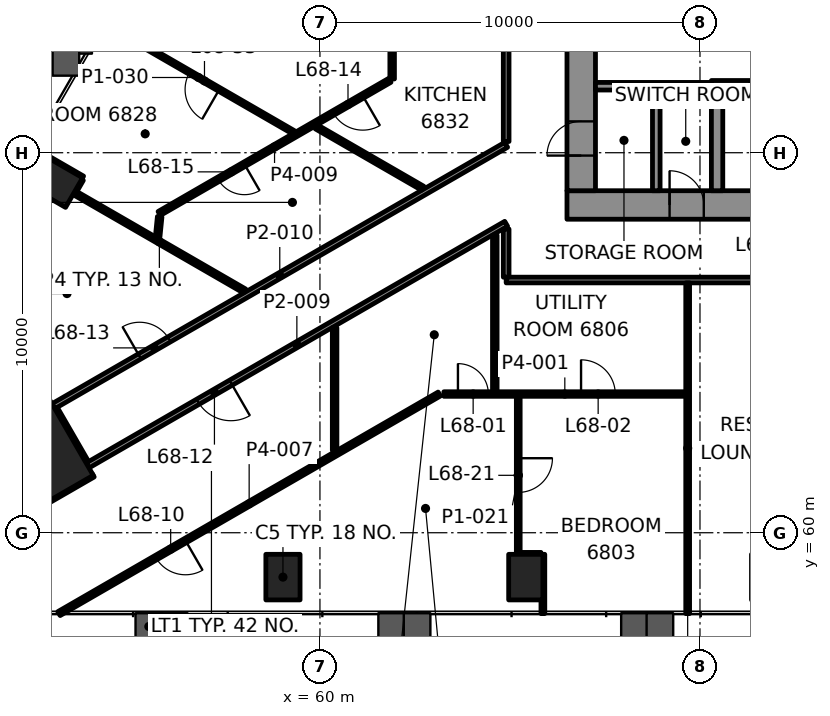
"""IFC4 building model, lengths in metres.
Left out: names, types, materials, properties, quantities, classifications, styles, units other than length and angle.
Written with IfcOpenShell. Run it as: python <this file> out.ifc"""

import sys

from ifc_helpers import new_model, si_unit, direction, frame, frame_2d, origin, origin_2d, place, context, subcontext, project, spatial, rectangle, hollow_rectangle, extrude, element, fill, save


model = new_model("IFC4")
c1 = context("Model", 3, precision=1e-05, world=origin(), true_north=direction((0.0, 1.0)))
c2 = subcontext(c1, "Body", "Model", "MODEL_VIEW")
j1 = project(units=[si_unit("LENGTHUNIT", "METRE"), si_unit("PLANEANGLEUNIT", "RADIAN")], contexts=[c1])
p1 = place(None, origin())
s1 = spatial("IfcSite", under=j1, at=p1, CompositionType="ELEMENT")
p2 = place(p1, origin())
s2 = spatial("IfcBuilding", under=s1, at=p2, CompositionType="ELEMENT")
p3 = place(p2, frame((0.0, 0.0, 284.6)))
s3 = spatial("IfcBuildingStorey", under=s2, at=p3, CompositionType="ELEMENT", Elevation=284.6)
p4 = place(p3, frame((52.396, 61.95, 0.0), z_axis=(0.0, 0.0, 1.0), x_axis=(0.5, -0.866025403784, 0.0)))
e1 = element("IfcColumn", 1, at=p4, inside=s3, PredefinedType="COLUMN", context=c2, shape_type="SweptSolid", body=[
    extrude(rectangle(XDim=2.4, YDim=2.4, at=origin_2d()), origin(), (0.0, 0.0, 1.0), 3.5),
])
for number, where, z_axis, x_axis in (
    (2, (59.027, 58.832, -0.0), (0.0, 0.0, 1.0), (1.0, 0.0, 0.0)),
    (3, (65.416, 58.832, -0.0), (0.0, 0.0, 1.0), (1.0, 0.0, 0.0)),
    (4, (53.011, 69.251, -0.0), (0.0, 0.0, 1.0), (-0.5, -0.866, 0.0)),
):
    element("IfcColumn", number, at=place(p3, frame(where, z_axis=z_axis, x_axis=x_axis)), inside=s3, PredefinedType="COLUMN", context=c2, shape_type="SweptSolid", body=[
        extrude(hollow_rectangle(XDim=0.9, YDim=1.2, WallThickness=0.06, at=origin_2d()), origin(), (0.0, 0.0, 1.0), 3.5),
    ])
p5 = place(p3, frame((66.5, 68.625, 0.0), z_axis=(0.0, 0.0, 1.0), x_axis=(1.0, 0.0, 0.0)))
e5 = element("IfcWall", 5, at=p5, inside=s3, PredefinedType="SHEAR", context=c2, shape_type="SweptSolid", body=[
    extrude(rectangle(XDim=17.0, YDim=0.75, at=frame_2d((8.5, 0.0))), origin(), (0.0, 0.0, 1.0), 3.3),
])
p6 = place(p5, frame((2.7, 0.0, 0.0)))
e6 = element("IfcOpeningElement", 6, at=p6, cuts=e5, PredefinedType="OPENING", context=c2, shape_type="SweptSolid", body=[
    extrude(rectangle(XDim=0.9, YDim=2.1, at=frame_2d((0.45, 1.05))), frame((0.0, 0.385, 0.0), z_axis=(0.0, -1.0, 0.0), x_axis=(1.0, 0.0, 0.0)), (0.0, 0.0, 1.0), 0.77),
])
p7 = place(p3, frame((66.875, 69.0, 0.0), z_axis=(0.0, 0.0, 1.0), x_axis=(0.0, 1.0, 0.0)))
e7 = element("IfcWall", 7, at=p7, inside=s3, PredefinedType="SHEAR", context=c2, shape_type="SweptSolid", body=[
    extrude(rectangle(XDim=12.0, YDim=0.75, at=frame_2d((6.0, 0.0))), origin(), (0.0, 0.0, 1.0), 3.3),
])
p8 = place(p7, frame((3.7, 0.0, 0.0)))
e8 = element("IfcOpeningElement", 8, at=p8, cuts=e7, PredefinedType="OPENING", context=c2, shape_type="SweptSolid", body=[
    extrude(rectangle(XDim=1.2, YDim=2.1, at=frame_2d((0.6, 1.05))), frame((0.0, 0.385, 0.0), z_axis=(0.0, -1.0, 0.0), x_axis=(1.0, 0.0, 0.0)), (0.0, 0.0, 1.0), 0.77),
])
p9 = place(p7, frame((0.925, 0.0, 0.0)))
e9 = element("IfcOpeningElement", 9, at=p9, cuts=e7, PredefinedType="OPENING", context=c2, shape_type="SweptSolid", body=[
    extrude(rectangle(XDim=0.9, YDim=2.1, at=frame_2d((0.45, 1.05))), frame((0.0, 0.385, 0.0), z_axis=(0.0, -1.0, 0.0), x_axis=(1.0, 0.0, 0.0)), (0.0, 0.0, 1.0), 0.77),
])
p10 = place(p3, frame((70.3, 71.75, 0.0), z_axis=(0.0, 0.0, 1.0), x_axis=(1.0, 0.0, 0.0)))
e10 = element("IfcWall", 10, at=p10, inside=s3, PredefinedType="SHEAR", context=c2, shape_type="SweptSolid", body=[
    extrude(rectangle(XDim=11.5, YDim=0.3, at=frame_2d((5.75, 0.0))), origin(), (0.0, 0.0, 1.0), 3.3),
])
p11 = place(p10, frame((1.0, 0.0, 0.0)))
e11 = element("IfcOpeningElement", 11, at=p11, cuts=e10, PredefinedType="OPENING", context=c2, shape_type="SweptSolid", body=[
    extrude(rectangle(XDim=1.1, YDim=2.1, at=frame_2d((0.55, 1.05))), frame((0.0, 0.16, 0.0), z_axis=(0.0, -1.0, 0.0), x_axis=(1.0, 0.0, 0.0)), (0.0, 0.0, 1.0), 0.32),
])
p12 = place(p10, frame((3.8, 0.0, 0.0)))
e12 = element("IfcOpeningElement", 12, at=p12, cuts=e10, PredefinedType="OPENING", context=c2, shape_type="SweptSolid", body=[
    extrude(rectangle(XDim=1.1, YDim=2.1, at=frame_2d((0.55, 1.05))), frame((0.0, 0.16, 0.0), z_axis=(0.0, -1.0, 0.0), x_axis=(1.0, 0.0, 0.0)), (0.0, 0.0, 1.0), 0.32),
])
p13 = place(p10, frame((6.6, 0.0, 0.0)))
e13 = element("IfcOpeningElement", 13, at=p13, cuts=e10, PredefinedType="OPENING", context=c2, shape_type="SweptSolid", body=[
    extrude(rectangle(XDim=1.1, YDim=2.1, at=frame_2d((0.55, 1.05))), frame((0.0, 0.16, 0.0), z_axis=(0.0, -1.0, 0.0), x_axis=(1.0, 0.0, 0.0)), (0.0, 0.0, 1.0), 0.32),
])
p14 = place(p10, frame((9.4, 0.0, 0.0)))
e14 = element("IfcOpeningElement", 14, at=p14, cuts=e10, PredefinedType="OPENING", context=c2, shape_type="SweptSolid", body=[
    extrude(rectangle(XDim=1.1, YDim=2.1, at=frame_2d((0.55, 1.05))), frame((0.0, 0.16, 0.0), z_axis=(0.0, -1.0, 0.0), x_axis=(1.0, 0.0, 0.0)), (0.0, 0.0, 1.0), 0.32),
])
p15 = place(p3, frame((70.45, 69.0, 0.0), z_axis=(0.0, 0.0, 1.0), x_axis=(0.0, 1.0, 0.0)))
e15 = element("IfcWall", 15, at=p15, inside=s3, PredefinedType="SHEAR", context=c2, shape_type="SweptSolid", body=[
    extrude(rectangle(XDim=2.6, YDim=0.3, at=frame_2d((1.3, 0.0))), origin(), (0.0, 0.0, 1.0), 3.3),
])
p16 = place(p3, frame((65.268, 59.432, 0.0), z_axis=(0.0, 0.0, 1.0), x_axis=(1.0, 0.0, 0.0)))
e16 = element("IfcWall", 16, at=p16, inside=s3, PredefinedType="PARTITIONING", context=c2, shape_type="SweptSolid", body=[
    extrude(rectangle(XDim=0.548, YDim=0.1, at=frame_2d((0.274, 0.0))), origin(), (0.0, 0.0, 1.0), 2.7),
])
p17 = place(p3, frame((63.261, 63.65, 0.0), z_axis=(0.0, 0.0, 1.0), x_axis=(1.0, 0.0, 0.0)))
e17 = element("IfcWall", 17, at=p17, inside=s3, PredefinedType="PARTITIONING", context=c2, shape_type="SweptSolid", body=[
    extrude(rectangle(XDim=6.364, YDim=0.12, at=frame_2d((3.182, 0.0))), origin(), (0.0, 0.0, 1.0), 2.7),
])
p18 = place(p17, frame((0.37, 0.0, 0.0)))
e18 = element("IfcOpeningElement", 18, at=p18, cuts=e17, PredefinedType="OPENING", context=c2, shape_type="SweptSolid", body=[
    extrude(rectangle(XDim=0.8, YDim=2.1, at=frame_2d((0.4, 1.05))), frame((0.0, 0.07, 0.0), z_axis=(0.0, -1.0, 0.0), x_axis=(1.0, 0.0, 0.0)), (0.0, 0.0, 1.0), 0.14),
])
p19 = place(p17, frame((3.609, 0.0, 0.0)))
e19 = element("IfcOpeningElement", 19, at=p19, cuts=e17, PredefinedType="OPENING", context=c2, shape_type="SweptSolid", body=[
    extrude(rectangle(XDim=0.9, YDim=2.1, at=frame_2d((0.45, 1.05))), frame((0.0, 0.07, 0.0), z_axis=(0.0, -1.0, 0.0), x_axis=(1.0, 0.0, 0.0)), (0.0, 0.0, 1.0), 0.14),
])
p20 = place(p3, frame((85.1, 66.65, 0.0), z_axis=(0.0, 0.0, 1.0), x_axis=(-1.0, 0.0, 0.0)))
e20 = element("IfcWall", 20, at=p20, inside=s3, PredefinedType="PARTITIONING", context=c2, shape_type="SweptSolid", body=[
    extrude(rectangle(XDim=20.2, YDim=0.15, at=frame_2d((10.1, 0.0))), origin(), (0.0, 0.0, 1.0), 2.7),
])
p21 = place(p20, frame((6.405, 0.0, 0.0)))
e21 = element("IfcOpeningElement", 21, at=p21, cuts=e20, PredefinedType="OPENING", context=c2, shape_type="SweptSolid", body=[
    extrude(rectangle(XDim=1.0, YDim=2.1, at=frame_2d((0.5, 1.05))), frame((0.0, 0.085, 0.0), z_axis=(0.0, -1.0, 0.0), x_axis=(1.0, 0.0, 0.0)), (0.0, 0.0, 1.0), 0.17),
])
p22 = place(p20, frame((12.845, 0.0, 0.0)))
e22 = element("IfcOpeningElement", 22, at=p22, cuts=e20, PredefinedType="OPENING", context=c2, shape_type="SweptSolid", body=[
    extrude(rectangle(XDim=0.9, YDim=2.1, at=frame_2d((0.45, 1.05))), frame((0.0, 0.085, 0.0), z_axis=(0.0, -1.0, 0.0), x_axis=(1.0, 0.0, 0.0)), (0.0, 0.0, 1.0), 0.17),
])
p23 = place(p3, frame((63.141, 63.65, 0.0), z_axis=(0.0, 0.0, 1.0), x_axis=(-0.866023045711, -0.500004084281, 0.0)))
e23 = element("IfcWall", 23, at=p23, inside=s3, PredefinedType="PARTITIONING", context=c2, shape_type="SweptSolid", body=[
    extrude(rectangle(XDim=11.556, YDim=0.12, at=frame_2d((5.778, 0.0))), origin(), (0.0, 0.0, 1.0), 2.7),
])
p24 = place(p23, frame((7.713, 0.0, 0.0)))
e24 = element("IfcOpeningElement", 24, at=p24, cuts=e23, PredefinedType="OPENING", context=c2, shape_type="SweptSolid", body=[
    extrude(rectangle(XDim=0.9, YDim=2.1, at=frame_2d((0.45, 1.05))), frame((0.0, 0.07, 0.0), z_axis=(0.0, -1.0, 0.0), x_axis=(1.0, 0.0, 0.0)), (0.0, 0.0, 1.0), 0.14),
])
p25 = place(p3, frame((51.957, 60.311, 0.0), z_axis=(0.0, 0.0, 1.0), x_axis=(0.866036455013, 0.499980858223, 0.0)))
e25 = element("IfcWall", 25, at=p25, inside=s3, PredefinedType="PARTITIONING", context=c2, shape_type="SweptSolid", body=[
    extrude(rectangle(XDim=2.399, YDim=0.1, at=frame_2d((1.199, 0.0))), origin(), (0.0, 0.0, 1.0), 2.7),
])
p26 = place(p3, frame((64.9, 68.13, 0.0), z_axis=(0.0, 0.0, 1.0), x_axis=(-0.866023199005, -0.500003818771, 0.0)))
e26 = element("IfcWall", 26, at=p26, inside=s3, PredefinedType="PARTITIONING", context=c2, shape_type="SweptSolid", body=[
    extrude(rectangle(XDim=12.719, YDim=0.15, at=frame_2d((6.359, 0.0))), origin(), (0.0, 0.0, 1.0), 2.547),
])
p27 = place(p26, frame((8.364, 0.0, 0.0)))
e27 = element("IfcOpeningElement", 27, at=p27, cuts=e26, PredefinedType="OPENING", context=c2, shape_type="SweptSolid", body=[
    extrude(rectangle(XDim=1.0, YDim=2.1, at=frame_2d((0.5, 1.05))), frame((0.0, 0.085, 0.0), z_axis=(0.0, -1.0, 0.0), x_axis=(1.0, 0.0, 0.0)), (0.0, 0.0, 1.0), 0.17),
])
p28 = place(p3, frame((52.986, 63.329, 0.0), z_axis=(0.0, 0.0, 1.0), x_axis=(0.866027482275, 0.499996399932, 0.0)))
e28 = element("IfcWall", 28, at=p28, inside=s3, PredefinedType="PARTITIONING", context=c2, shape_type="SweptSolid", body=[
    extrude(rectangle(XDim=13.757, YDim=0.15, at=frame_2d((6.879, 0.0))), origin(), (0.0, 0.0, 1.0), 2.7),
])
p29 = place(p28, frame((2.62, 0.0, 0.0)))
e29 = element("IfcOpeningElement", 29, at=p29, cuts=e28, PredefinedType="OPENING", context=c2, shape_type="SweptSolid", body=[
    extrude(rectangle(XDim=0.9, YDim=2.1, at=frame_2d((0.45, 1.05))), frame((0.0, 0.085, 0.0), z_axis=(0.0, -1.0, 0.0), x_axis=(1.0, 0.0, 0.0)), (0.0, 0.0, 1.0), 0.17),
])
p30 = place(p3, frame((61.84, 71.906, 0.0), z_axis=(0.0, 0.0, 1.0), x_axis=(-0.866015603583, -0.500016974063, 0.0)))
e30 = element("IfcWall", 30, at=p30, inside=s3, PredefinedType="PARTITIONING", context=c2, shape_type="SweptSolid", body=[
    extrude(rectangle(XDim=7.008, YDim=0.12, at=frame_2d((3.504, 0.0))), origin(), (0.0, 0.0, 1.0), 2.7),
])
p31 = place(p30, frame((0.822, 0.0, 0.0)))
e31 = element("IfcOpeningElement", 31, at=p31, cuts=e30, PredefinedType="OPENING", context=c2, shape_type="SweptSolid", body=[
    extrude(rectangle(XDim=0.9, YDim=2.1, at=frame_2d((0.45, 1.05))), frame((0.0, 0.07, 0.0), z_axis=(0.0, -1.0, 0.0), x_axis=(1.0, 0.0, 0.0)), (0.0, 0.0, 1.0), 0.14),
])
p32 = place(p30, frame((4.418, 0.0, 0.0)))
e32 = element("IfcOpeningElement", 32, at=p32, cuts=e30, PredefinedType="OPENING", context=c2, shape_type="SweptSolid", body=[
    extrude(rectangle(XDim=0.8, YDim=2.1, at=frame_2d((0.4, 1.05))), frame((0.0, 0.07, 0.0), z_axis=(0.0, -1.0, 0.0), x_axis=(1.0, 0.0, 0.0)), (0.0, 0.0, 1.0), 0.14),
])
p33 = place(p3, frame((53.561, 69.003, 0.0), z_axis=(0.0, 0.0, 1.0), x_axis=(0.500241622161, 0.865885858216, 0.0)))
e33 = element("IfcWall", 33, at=p33, inside=s3, PredefinedType="PARTITIONING", context=c2, shape_type="SweptSolid", body=[
    extrude(rectangle(XDim=0.339, YDim=0.1, at=frame_2d((0.169, 0.0))), origin(), (0.0, 0.0, 1.0), 2.7),
])
p34 = place(p3, frame((55.729, 67.781, 0.0), z_axis=(0.0, 0.0, 1.0), x_axis=(0.099548724898, 0.995032688594, 0.0)))
e34 = element("IfcWall", 34, at=p34, inside=s3, PredefinedType="PARTITIONING", context=c2, shape_type="SweptSolid", body=[
    extrude(rectangle(XDim=0.537, YDim=0.12, at=frame_2d((0.269, 0.0))), origin(), (0.0, 0.0, 1.0), 2.7),
])
p35 = place(p3, frame((69.676, 57.872, 0.0), z_axis=(0.0, 0.0, 1.0), x_axis=(0.0, 1.0, 0.0)))
e35 = element("IfcWall", 35, at=p35, inside=s3, PredefinedType="PARTITIONING", context=c2, shape_type="SweptSolid", body=[
    extrude(rectangle(XDim=8.703, YDim=0.1, at=frame_2d((4.352, 0.0))), origin(), (0.0, 0.0, 1.0), 2.688),
])
p36 = place(p3, frame((65.866, 57.872, 0.0), z_axis=(0.0, 0.0, 1.0), x_axis=(0.0, 1.0, 0.0)))
e36 = element("IfcWall", 36, at=p36, inside=s3, PredefinedType="PARTITIONING", context=c2, shape_type="SweptSolid", body=[
    extrude(rectangle(XDim=1.56, YDim=0.1, at=frame_2d((0.78, 0.0))), origin(), (0.0, 0.0, 1.0), 2.688),
])
p37 = place(p3, frame((65.218, 63.59, 0.0), z_axis=(0.0, 0.0, 1.0), x_axis=(0.0, -1.0, 0.0)))
e37 = element("IfcWall", 37, at=p37, inside=s3, PredefinedType="PARTITIONING", context=c2, shape_type="SweptSolid", body=[
    extrude(rectangle(XDim=4.158, YDim=0.1, at=frame_2d((2.079, 0.0))), origin(), (0.0, 0.0, 1.0), 2.7),
])
p38 = place(p37, frame((1.629, 0.0, 0.0)))
e38 = element("IfcOpeningElement", 38, at=p38, cuts=e37, PredefinedType="OPENING", context=c2, shape_type="SweptSolid", body=[
    extrude(rectangle(XDim=0.9, YDim=2.1, at=frame_2d((0.45, 1.05))), frame((0.0, 0.06, 0.0), z_axis=(0.0, -1.0, 0.0), x_axis=(1.0, 0.0, 0.0)), (0.0, 0.0, 1.0), 0.12),
])
p39 = place(p3, frame((64.9, 66.725, 0.0), z_axis=(0.0, 0.0, 1.0), x_axis=(0.0, 1.0, 0.0)))
e39 = element("IfcWall", 39, at=p39, inside=s3, PredefinedType="PARTITIONING", context=c2, shape_type="SweptSolid", body=[
    extrude(rectangle(XDim=1.268, YDim=0.15, at=frame_2d((0.634, 0.0))), origin(), (0.0, 0.0, 1.0), 2.547),
])
p40 = place(p3, frame((64.9, 70.295, 0.0), z_axis=(0.0, 0.0, 1.0), x_axis=(0.0, 1.0, 0.0)))
e40 = element("IfcWall", 40, at=p40, inside=s3, PredefinedType="PARTITIONING", context=c2, shape_type="SweptSolid", body=[
    extrude(rectangle(XDim=13.055, YDim=0.15, at=frame_2d((6.528, 0.0))), origin(), (0.0, 0.0, 1.0), 2.7),
])
p41 = place(p40, frame((8.07, 0.0, 0.0)))
e41 = element("IfcOpeningElement", 41, at=p41, cuts=e40, PredefinedType="OPENING", context=c2, shape_type="SweptSolid", body=[
    extrude(rectangle(XDim=1.0, YDim=2.1, at=frame_2d((0.5, 1.05))), frame((0.0, 0.085, 0.0), z_axis=(0.0, -1.0, 0.0), x_axis=(1.0, 0.0, 0.0)), (0.0, 0.0, 1.0), 0.17),
])
p42 = place(p3, frame((64.601, 63.71, 0.0), z_axis=(0.0, 0.0, 1.0), x_axis=(0.0, 1.0, 0.0)))
e42 = element("IfcWall", 42, at=p42, inside=s3, PredefinedType="PARTITIONING", context=c2, shape_type="SweptSolid", body=[
    extrude(rectangle(XDim=4.12, YDim=0.12, at=frame_2d((2.06, 0.0))), origin(), (0.0, 0.0, 1.0), 2.547),
])
p43 = place(p3, frame((61.9, 71.94, 0.0), z_axis=(0.0, 0.0, 1.0), x_axis=(0.0, 1.0, 0.0)))
e43 = element("IfcWall", 43, at=p43, inside=s3, PredefinedType="PARTITIONING", context=c2, shape_type="SweptSolid", body=[
    extrude(rectangle(XDim=13.792, YDim=0.12, at=frame_2d((6.896, 0.0))), origin(), (0.0, 0.0, 1.0), 2.688),
])
p44 = place(p43, frame((8.206, 0.0, 0.0)))
e44 = element("IfcOpeningElement", 44, at=p44, cuts=e43, PredefinedType="OPENING", context=c2, shape_type="SweptSolid", body=[
    extrude(rectangle(XDim=0.9, YDim=2.1, at=frame_2d((0.45, 1.05))), frame((0.0, 0.07, 0.0), z_axis=(0.0, -1.0, 0.0), x_axis=(1.0, 0.0, 0.0)), (0.0, 0.0, 1.0), 0.14),
])
p45 = place(p3, frame((60.386, 62.169, 0.0), z_axis=(0.0, 0.0, 1.0), x_axis=(0.0, 1.0, 0.0)))
e45 = element("IfcWall", 45, at=p45, inside=s3, PredefinedType="PARTITIONING", context=c2, shape_type="SweptSolid", body=[
    extrude(rectangle(XDim=3.228, YDim=0.12, at=frame_2d((1.614, 0.0))), origin(), (0.0, 0.0, 1.0), 2.547),
])
p46 = place(p3, frame((53.845, 61.84, 0.0), z_axis=(0.0, 0.0, 1.0), x_axis=(-0.499988108725, 0.866032269107, 0.0)))
e46 = element("IfcWall", 46, at=p46, inside=s3, PredefinedType="PARTITIONING", context=c2, shape_type="SweptSolid", body=[
    extrude(rectangle(XDim=1.644, YDim=0.15, at=frame_2d((0.822, 0.0))), origin(), (0.0, 0.0, 1.0), 2.547),
])
p47 = place(p3, frame((62.702, 69.066, 0.0), z_axis=(0.0, 0.0, 1.0), x_axis=(-0.866033195618, 0.499986503906, 0.0)))
e47 = element("IfcWall", 47, at=p47, inside=s3, PredefinedType="PARTITIONING", context=c2, shape_type="SweptSolid", body=[
    extrude(rectangle(XDim=3.228, YDim=0.12, at=frame_2d((1.614, 0.0))), origin(), (0.0, 0.0, 1.0), 2.7),
])
p48 = place(p3, frame((59.301, 70.539, 0.0), z_axis=(0.0, 0.0, 1.0), x_axis=(-0.866021213215, 0.500007258209, 0.0)))
e48 = element("IfcWall", 48, at=p48, inside=s3, PredefinedType="PARTITIONING", context=c2, shape_type="SweptSolid", body=[
    extrude(rectangle(XDim=5.763, YDim=0.1, at=frame_2d((2.882, 0.0))), origin(), (0.0, 0.0, 1.0), 2.7),
])
p49 = place(p48, frame((2.252, 0.0, 0.0)))
e49 = element("IfcOpeningElement", 49, at=p49, cuts=e48, PredefinedType="OPENING", context=c2, shape_type="SweptSolid", body=[
    extrude(rectangle(XDim=0.9, YDim=2.1, at=frame_2d((0.45, 1.05))), frame((0.0, 0.06, 0.0), z_axis=(0.0, -1.0, 0.0), x_axis=(1.0, 0.0, 0.0)), (0.0, 0.0, 1.0), 0.12),
])
p50 = place(p3, frame((53.756, 69.341, 0.0), z_axis=(0.0, 0.0, 1.0), x_axis=(-0.866066905393, 0.499928110214, 0.0)))
e50 = element("IfcWall", 50, at=p50, inside=s3, PredefinedType="PARTITIONING", context=c2, shape_type="SweptSolid", body=[
    extrude(rectangle(XDim=1.199, YDim=0.1, at=frame_2d((0.6, 0.0))), origin(), (0.0, 0.0, 1.0), 2.7),
])
p51 = place(p3, frame((58.017, 66.361, 0.0), z_axis=(0.0, 0.0, 1.0), x_axis=(-0.866018392704, 0.500012143352, 0.0)))
e51 = element("IfcWall", 51, at=p51, inside=s3, PredefinedType="PARTITIONING", context=c2, shape_type="SweptSolid", body=[
    extrude(rectangle(XDim=5.179, YDim=0.12, at=frame_2d((2.59, 0.0))), origin(), (0.0, 0.0, 1.0), 2.7),
])
p52 = place(p3, frame((67.25, 71.75, 0.0), z_axis=(0.0, 0.0, 1.0), x_axis=(1.0, 0.0, 0.0)))
e52 = element("IfcWall", 52, at=p52, inside=s3, PredefinedType="PARTITIONING", context=c2, shape_type="SweptSolid", body=[
    extrude(rectangle(XDim=3.05, YDim=0.2, at=frame_2d((1.525, 0.0))), origin(), (0.0, 0.0, 1.0), 3.3),
])
p53 = place(p3, frame((68.85, 69.0, 0.0), z_axis=(0.0, 0.0, 1.0), x_axis=(0.0, 1.0, 0.0)))
e53 = element("IfcWall", 53, at=p53, inside=s3, PredefinedType="PARTITIONING", context=c2, shape_type="SweptSolid", body=[
    extrude(rectangle(XDim=2.65, YDim=0.2, at=frame_2d((1.325, 0.0))), origin(), (0.0, 0.0, 1.0), 3.3),
])
p54 = place(p18, origin())
e54 = element("IfcDoor", 54, at=p54, inside=s3, OperationType="SINGLE_SWING_RIGHT", PredefinedType="DOOR", context=c2, shape_type="SweptSolid", body=[
    extrude(rectangle(XDim=0.8, YDim=2.1, at=frame_2d((0.4, 1.05))), frame((0.0, 0.025, 0.0), z_axis=(0.0, -1.0, 0.0), x_axis=(1.0, 0.0, 0.0)), (0.0, 0.0, 1.0), 0.05),
])
fill(e18, e54)
p55 = place(p19, origin())
e55 = element("IfcDoor", 55, at=p55, inside=s3, OperationType="SINGLE_SWING_LEFT", PredefinedType="DOOR", context=c2, shape_type="SweptSolid", body=[
    extrude(rectangle(XDim=0.9, YDim=2.1, at=frame_2d((0.45, 1.05))), frame((0.0, 0.025, 0.0), z_axis=(0.0, -1.0, 0.0), x_axis=(1.0, 0.0, 0.0)), (0.0, 0.0, 1.0), 0.05),
])
fill(e19, e55)
p56 = place(p24, origin())
e56 = element("IfcDoor", 56, at=p56, inside=s3, OperationType="SINGLE_SWING_RIGHT", PredefinedType="DOOR", context=c2, shape_type="SweptSolid", body=[
    extrude(rectangle(XDim=0.9, YDim=2.1, at=frame_2d((0.45, 1.05))), frame((0.0, 0.025, 0.0), z_axis=(0.0, -1.0, 0.0), x_axis=(1.0, 0.0, 0.0)), (0.0, 0.0, 1.0), 0.05),
])
fill(e24, e56)
p57 = place(p27, origin())
e57 = element("IfcDoor", 57, at=p57, inside=s3, OperationType="SINGLE_SWING_LEFT", PredefinedType="DOOR", context=c2, shape_type="SweptSolid", body=[
    extrude(rectangle(XDim=1.0, YDim=2.1, at=frame_2d((0.5, 1.05))), frame((0.0, 0.025, 0.0), z_axis=(0.0, -1.0, 0.0), x_axis=(1.0, 0.0, 0.0)), (0.0, 0.0, 1.0), 0.05),
])
fill(e27, e57)
p58 = place(p29, origin())
e58 = element("IfcDoor", 58, at=p58, inside=s3, OperationType="SINGLE_SWING_LEFT", PredefinedType="DOOR", context=c2, shape_type="SweptSolid", body=[
    extrude(rectangle(XDim=0.9, YDim=2.1, at=frame_2d((0.45, 1.05))), frame((0.0, 0.025, 0.0), z_axis=(0.0, -1.0, 0.0), x_axis=(1.0, 0.0, 0.0)), (0.0, 0.0, 1.0), 0.05),
])
fill(e29, e58)
p59 = place(p31, origin())
e59 = element("IfcDoor", 59, at=p59, inside=s3, OperationType="SINGLE_SWING_LEFT", PredefinedType="DOOR", context=c2, shape_type="SweptSolid", body=[
    extrude(rectangle(XDim=0.9, YDim=2.1, at=frame_2d((0.45, 1.05))), frame((0.0, 0.025, 0.0), z_axis=(0.0, -1.0, 0.0), x_axis=(1.0, 0.0, 0.0)), (0.0, 0.0, 1.0), 0.05),
])
fill(e31, e59)
p60 = place(p32, origin())
e60 = element("IfcDoor", 60, at=p60, inside=s3, OperationType="SINGLE_SWING_LEFT", PredefinedType="DOOR", context=c2, shape_type="SweptSolid", body=[
    extrude(rectangle(XDim=0.8, YDim=2.1, at=frame_2d((0.4, 1.05))), frame((0.0, 0.025, 0.0), z_axis=(0.0, -1.0, 0.0), x_axis=(1.0, 0.0, 0.0)), (0.0, 0.0, 1.0), 0.05),
])
fill(e32, e60)
p61 = place(p38, origin())
e61 = element("IfcDoor", 61, at=p61, inside=s3, OperationType="SINGLE_SWING_RIGHT", PredefinedType="DOOR", context=c2, shape_type="SweptSolid", body=[
    extrude(rectangle(XDim=0.9, YDim=2.1, at=frame_2d((0.45, 1.05))), frame((0.0, 0.025, 0.0), z_axis=(0.0, -1.0, 0.0), x_axis=(1.0, 0.0, 0.0)), (0.0, 0.0, 1.0), 0.05),
])
fill(e38, e61)
p62 = place(p49, origin())
e62 = element("IfcDoor", 62, at=p62, inside=s3, OperationType="SINGLE_SWING_LEFT", PredefinedType="DOOR", context=c2, shape_type="SweptSolid", body=[
    extrude(rectangle(XDim=0.9, YDim=2.1, at=frame_2d((0.45, 1.05))), frame((0.0, 0.025, 0.0), z_axis=(0.0, -1.0, 0.0), x_axis=(1.0, 0.0, 0.0)), (0.0, 0.0, 1.0), 0.05),
])
fill(e49, e62)
p63 = place(p9, origin())
e63 = element("IfcDoor", 63, at=p63, inside=s3, OperationType="SINGLE_SWING_RIGHT", PredefinedType="DOOR", context=c2, shape_type="SweptSolid", body=[
    extrude(rectangle(XDim=0.9, YDim=2.1, at=frame_2d((0.45, 1.05))), frame((0.0, 0.095, 0.0), z_axis=(0.0, -1.0, 0.0), x_axis=(1.0, 0.0, 0.0)), (0.0, 0.0, 1.0), 0.19),
])
fill(e9, e63)
p64 = place(p6, origin())
e64 = element("IfcDoor", 64, at=p64, inside=s3, OperationType="SINGLE_SWING_LEFT", PredefinedType="DOOR", context=c2, shape_type="SweptSolid", body=[
    extrude(rectangle(XDim=0.9, YDim=2.1, at=frame_2d((0.45, 1.05))), frame((0.0, 0.095, 0.0), z_axis=(0.0, -1.0, 0.0), x_axis=(1.0, 0.0, 0.0)), (0.0, 0.0, 1.0), 0.19),
])
fill(e6, e64)
save(model, sys.argv[1])
